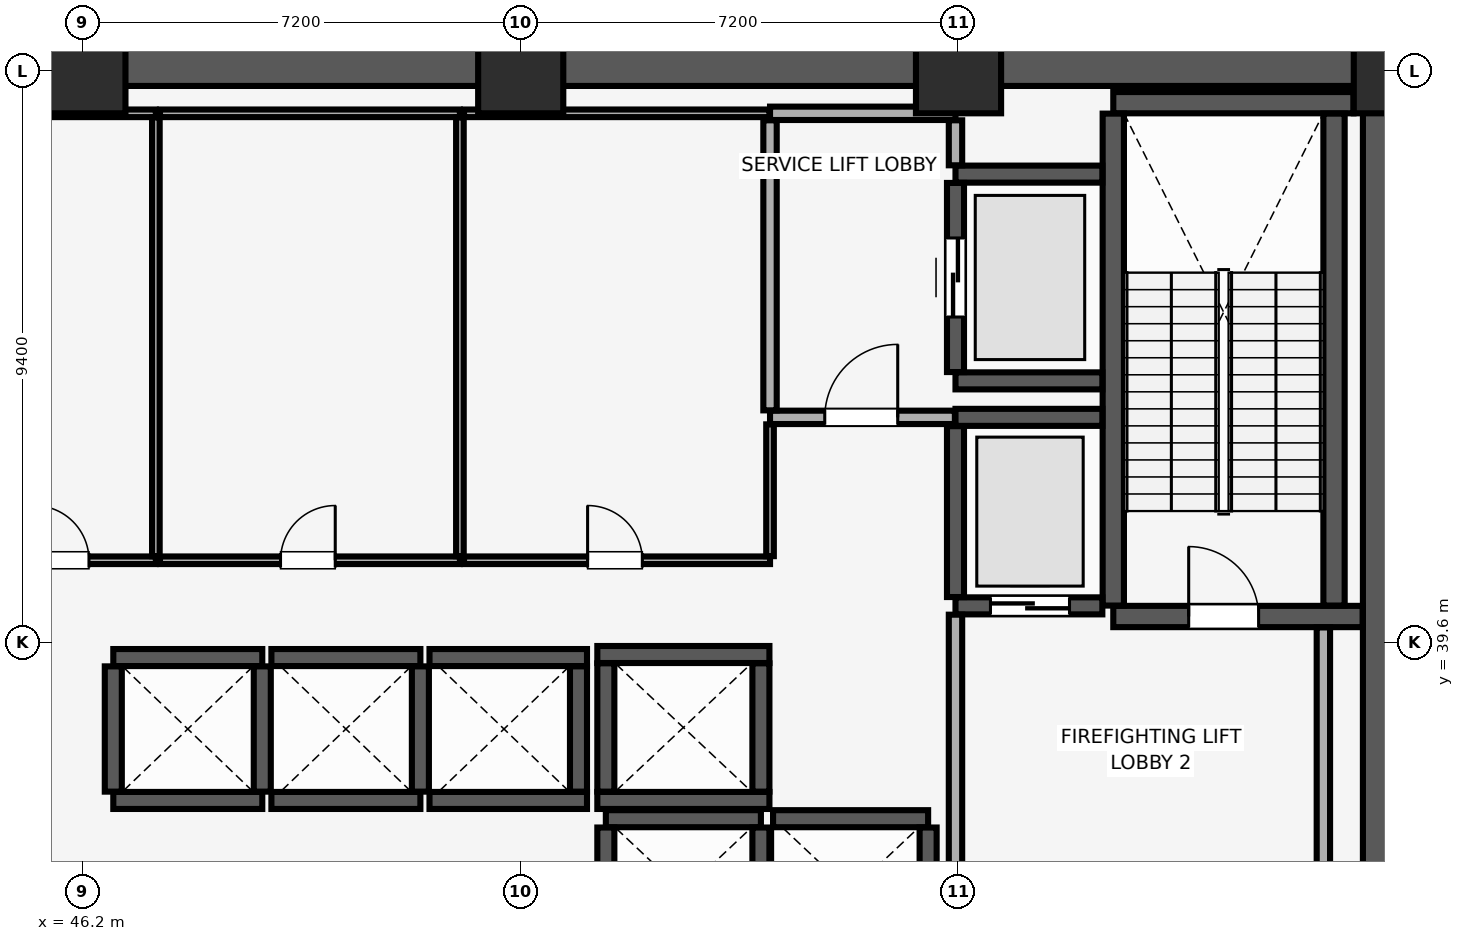
"""IFC4 building model, lengths in metres.
Left out: names, types, materials, properties, quantities, classifications, styles, units other than length and angle.
Written with IfcOpenShell. Run it as: python <this file> out.ifc"""

import sys

from ifc_helpers import new_model, si_unit, direction, frame, frame_2d, origin, origin_2d, place, context, subcontext, project, spatial, rectangle, extrude, element, fill, save


model = new_model("IFC4")
c1 = context("Model", 3, precision=1e-05, world=origin(), true_north=direction((0.0, 1.0)))
c2 = subcontext(c1, "Body", "Model", "MODEL_VIEW")
j1 = project(units=[si_unit("LENGTHUNIT", "METRE"), si_unit("PLANEANGLEUNIT", "RADIAN")], contexts=[c1])
p1 = place(None, origin())
s1 = spatial("IfcSite", under=j1, at=p1, CompositionType="ELEMENT")
p2 = place(p1, origin())
s2 = spatial("IfcBuilding", under=s1, at=p2, CompositionType="ELEMENT")
p3 = place(p2, frame((0.0, 0.0, 26.0)))
s3 = spatial("IfcBuildingStorey", under=s2, at=p3, CompositionType="ELEMENT", Elevation=26.0)
for number, where, z_axis, x_axis in (
    (1, (46.2, 49.0, 0.0), (0.0, 0.0, 1.0), (1.0, 0.0, 0.0)),
    (2, (53.4, 49.0, 0.0), (0.0, 0.0, 1.0), (1.0, 0.0, 0.0)),
    (3, (60.6, 49.0, 0.0), (0.0, 0.0, 1.0), (1.0, 0.0, 0.0)),
    (4, (67.8, 49.0, 0.0), (0.0, 0.0, 1.0), (1.0, 0.0, 0.0)),
):
    element("IfcColumn", number, at=place(p3, frame(where, z_axis=z_axis, x_axis=x_axis)), inside=s3, PredefinedType="COLUMN", context=c2, shape_type="SweptSolid", body=[
        extrude(rectangle(XDim=1.4, YDim=1.4, at=origin_2d()), origin(), (0.0, 0.0, 1.0), 5.16),
    ])
p4 = place(p3, frame((16.2, 49.3, 0.0), z_axis=(0.0, 0.0, 1.0), x_axis=(1.0, 0.0, 0.0)))
e5 = element("IfcWall", 5, at=p4, inside=s3, PredefinedType="SHEAR", context=c2, shape_type="SweptSolid", body=[
    extrude(rectangle(XDim=51.6, YDim=1.1, at=frame_2d((25.8, 0.0))), origin(), (0.0, 0.0, 1.0), 5.12),
])
p5 = place(p3, frame((67.8, 29.4, 0.0), z_axis=(0.0, 0.0, 1.0), x_axis=(0.0, 1.0, 0.0)))
e6 = element("IfcWall", 6, at=p5, inside=s3, PredefinedType="SHEAR", context=c2, shape_type="SweptSolid", body=[
    extrude(rectangle(XDim=19.2, YDim=1.1, at=frame_2d((9.6, 0.0))), origin(), (0.0, 0.0, 1.0), 5.12),
])
p6 = place(p3, frame((63.145, 40.025, 0.0), z_axis=(0.0, 0.0, 1.0), x_axis=(1.0, 0.0, 0.0)))
e7 = element("IfcWall", 7, at=p6, inside=s3, PredefinedType="SHEAR", context=c2, shape_type="SweptSolid", body=[
    extrude(rectangle(XDim=4.1, YDim=0.35, at=frame_2d((2.05, 0.0))), origin(), (0.0, 0.0, 1.0), 5.12),
])
p7 = place(p6, frame((1.24, 0.0, 0.0)))
e8 = element("IfcOpeningElement", 8, at=p7, cuts=e7, PredefinedType="OPENING", context=c2, shape_type="SweptSolid", body=[
    extrude(rectangle(XDim=1.15, YDim=2.15, at=frame_2d((0.575, 1.075))), frame((0.0, 0.185, 0.0), z_axis=(0.0, -1.0, 0.0), x_axis=(1.0, 0.0, 0.0)), (0.0, 0.0, 1.0), 0.37),
])
p8 = place(p3, frame((63.145, 48.475, 0.0), z_axis=(0.0, 0.0, 1.0), x_axis=(1.0, 0.0, 0.0)))
e9 = element("IfcWall", 9, at=p8, inside=s3, PredefinedType="SHEAR", context=c2, shape_type="SweptSolid", body=[
    extrude(rectangle(XDim=3.95, YDim=0.35, at=frame_2d((1.975, 0.0))), origin(), (0.0, 0.0, 1.0), 5.12),
])
for number, where, z_axis, x_axis in (
    (10, (63.145, 40.205, 0.0), (0.0, 0.0, 1.0), (0.0, 1.0, 0.0)),
    (11, (66.775, 40.205, 0.0), (0.0, 0.0, 1.0), (0.0, 1.0, 0.0)),
):
    element("IfcWall", number, at=place(p3, frame(where, z_axis=z_axis, x_axis=x_axis)), inside=s3, PredefinedType="SHEAR", context=c2, shape_type="SweptSolid", body=[
        extrude(rectangle(XDim=8.09, YDim=0.35, at=frame_2d((4.045, 0.0))), origin(), (0.0, 0.0, 1.0), 5.12),
    ])
for number, where, z_axis, x_axis in (
    (12, (46.7, 37.0, 0.0), (0.0, 0.0, 1.0), (1.0, 0.0, 0.0)),
    (13, (46.7, 39.35, 0.0), (0.0, 0.0, 1.0), (1.0, 0.0, 0.0)),
):
    element("IfcWall", number, at=place(p3, frame(where, z_axis=z_axis, x_axis=x_axis)), inside=s3, PredefinedType="SHEAR", context=c2, shape_type="SweptSolid", body=[
        extrude(rectangle(XDim=2.45, YDim=0.28, at=frame_2d((1.225, 0.0))), origin(), (0.0, 0.0, 1.0), 5.12),
    ])
for number, where, z_axis, x_axis in (
    (14, (46.7, 37.145, 0.0), (0.0, 0.0, 1.0), (0.0, 1.0, 0.0)),
    (15, (49.15, 37.145, 0.0), (0.0, 0.0, 1.0), (0.0, 1.0, 0.0)),
):
    element("IfcWall", number, at=place(p3, frame(where, z_axis=z_axis, x_axis=x_axis)), inside=s3, PredefinedType="SHEAR", context=c2, shape_type="SweptSolid", body=[
        extrude(rectangle(XDim=2.06, YDim=0.28, at=frame_2d((1.03, 0.0))), origin(), (0.0, 0.0, 1.0), 5.12),
    ])
for number, where, z_axis, x_axis in (
    (16, (49.3, 37.0, 0.0), (0.0, 0.0, 1.0), (1.0, 0.0, 0.0)),
    (17, (49.3, 39.35, 0.0), (0.0, 0.0, 1.0), (1.0, 0.0, 0.0)),
):
    element("IfcWall", number, at=place(p3, frame(where, z_axis=z_axis, x_axis=x_axis)), inside=s3, PredefinedType="SHEAR", context=c2, shape_type="SweptSolid", body=[
        extrude(rectangle(XDim=2.45, YDim=0.28, at=frame_2d((1.225, 0.0))), origin(), (0.0, 0.0, 1.0), 5.12),
    ])
p9 = place(p3, frame((51.75, 37.145, 0.0), z_axis=(0.0, 0.0, 1.0), x_axis=(0.0, 1.0, 0.0)))
e18 = element("IfcWall", 18, at=p9, inside=s3, PredefinedType="SHEAR", context=c2, shape_type="SweptSolid", body=[
    extrude(rectangle(XDim=2.06, YDim=0.28, at=frame_2d((1.03, 0.0))), origin(), (0.0, 0.0, 1.0), 5.12),
])
for number, where, z_axis, x_axis in (
    (19, (51.9, 37.0, 0.0), (0.0, 0.0, 1.0), (1.0, 0.0, 0.0)),
    (20, (51.9, 39.35, 0.0), (0.0, 0.0, 1.0), (1.0, 0.0, 0.0)),
):
    element("IfcWall", number, at=place(p3, frame(where, z_axis=z_axis, x_axis=x_axis)), inside=s3, PredefinedType="SHEAR", context=c2, shape_type="SweptSolid", body=[
        extrude(rectangle(XDim=2.59, YDim=0.28, at=frame_2d((1.295, 0.0))), origin(), (0.0, 0.0, 1.0), 5.12),
    ])
p10 = place(p3, frame((54.35, 37.145, 0.0), z_axis=(0.0, 0.0, 1.0), x_axis=(0.0, 1.0, 0.0)))
e21 = element("IfcWall", 21, at=p10, inside=s3, PredefinedType="SHEAR", context=c2, shape_type="SweptSolid", body=[
    extrude(rectangle(XDim=2.06, YDim=0.28, at=frame_2d((1.03, 0.0))), origin(), (0.0, 0.0, 1.0), 5.12),
])
p11 = place(p3, frame((54.8, 36.7, 0.0), z_axis=(0.0, 0.0, 1.0), x_axis=(1.0, 0.0, 0.0)))
e22 = element("IfcWall", 22, at=p11, inside=s3, PredefinedType="SHEAR", context=c2, shape_type="SweptSolid", body=[
    extrude(rectangle(XDim=2.55, YDim=0.28, at=frame_2d((1.275, 0.0))), origin(), (0.0, 0.0, 1.0), 5.12),
])
for number, where, z_axis, x_axis in (
    (23, (54.8, 34.445, 0.0), (0.0, 0.0, 1.0), (0.0, 1.0, 0.0)),
    (24, (57.35, 34.445, 0.0), (0.0, 0.0, 1.0), (0.0, 1.0, 0.0)),
):
    element("IfcWall", number, at=place(p3, frame(where, z_axis=z_axis, x_axis=x_axis)), inside=s3, PredefinedType="SHEAR", context=c2, shape_type="SweptSolid", body=[
        extrude(rectangle(XDim=2.11, YDim=0.28, at=frame_2d((1.055, 0.0))), origin(), (0.0, 0.0, 1.0), 5.12),
    ])
p12 = place(p3, frame((57.55, 36.7, 0.0), z_axis=(0.0, 0.0, 1.0), x_axis=(1.0, 0.0, 0.0)))
e25 = element("IfcWall", 25, at=p12, inside=s3, PredefinedType="SHEAR", context=c2, shape_type="SweptSolid", body=[
    extrude(rectangle(XDim=2.55, YDim=0.28, at=frame_2d((1.275, 0.0))), origin(), (0.0, 0.0, 1.0), 5.12),
])
p13 = place(p3, frame((60.1, 34.445, 0.0), z_axis=(0.0, 0.0, 1.0), x_axis=(0.0, 1.0, 0.0)))
e26 = element("IfcWall", 26, at=p13, inside=s3, PredefinedType="SHEAR", context=c2, shape_type="SweptSolid", body=[
    extrude(rectangle(XDim=2.11, YDim=0.28, at=frame_2d((1.055, 0.0))), origin(), (0.0, 0.0, 1.0), 5.12),
])
for number, where, z_axis, x_axis in (
    (27, (54.66, 37.0, 0.0), (0.0, 0.0, 1.0), (1.0, 0.0, 0.0)),
    (28, (54.66, 39.4, 0.0), (0.0, 0.0, 1.0), (1.0, 0.0, 0.0)),
):
    element("IfcWall", number, at=place(p3, frame(where, z_axis=z_axis, x_axis=x_axis)), inside=s3, PredefinedType="SHEAR", context=c2, shape_type="SweptSolid", body=[
        extrude(rectangle(XDim=2.83, YDim=0.28, at=frame_2d((1.415, 0.0))), origin(), (0.0, 0.0, 1.0), 5.12),
    ])
for number, where, z_axis, x_axis in (
    (29, (54.8, 37.145, 0.0), (0.0, 0.0, 1.0), (0.0, 1.0, 0.0)),
    (30, (57.35, 37.145, 0.0), (0.0, 0.0, 1.0), (0.0, 1.0, 0.0)),
):
    element("IfcWall", number, at=place(p3, frame(where, z_axis=z_axis, x_axis=x_axis)), inside=s3, PredefinedType="SHEAR", context=c2, shape_type="SweptSolid", body=[
        extrude(rectangle(XDim=2.11, YDim=0.28, at=frame_2d((1.055, 0.0))), origin(), (0.0, 0.0, 1.0), 5.12),
    ])
p14 = place(p3, frame((60.55, 40.2, 0.0), z_axis=(0.0, 0.0, 1.0), x_axis=(1.0, 0.0, 0.0)))
e31 = element("IfcWall", 31, at=p14, inside=s3, PredefinedType="SHEAR", context=c2, shape_type="SweptSolid", body=[
    extrude(rectangle(XDim=2.415, YDim=0.28, at=frame_2d((1.208, 0.0))), origin(), (0.0, 0.0, 1.0), 5.12),
])
p15 = place(p14, frame((0.575, 0.0, 0.0)))
e32 = element("IfcOpeningElement", 32, at=p15, cuts=e31, PredefinedType="OPENING", context=c2, shape_type="SweptSolid", body=[
    extrude(rectangle(XDim=1.3, YDim=2.3, at=frame_2d((0.65, 1.15))), frame((0.0, 0.15, 0.0), z_axis=(0.0, -1.0, 0.0), x_axis=(1.0, 0.0, 0.0)), (0.0, 0.0, 1.0), 0.3),
])
p16 = place(p3, frame((60.55, 43.3, 0.0), z_axis=(0.0, 0.0, 1.0), x_axis=(1.0, 0.0, 0.0)))
e33 = element("IfcWall", 33, at=p16, inside=s3, PredefinedType="SHEAR", context=c2, shape_type="SweptSolid", body=[
    extrude(rectangle(XDim=2.415, YDim=0.28, at=frame_2d((1.208, 0.0))), origin(), (0.0, 0.0, 1.0), 5.12),
])
p17 = place(p3, frame((60.55, 40.345, 0.0), z_axis=(0.0, 0.0, 1.0), x_axis=(0.0, 1.0, 0.0)))
e34 = element("IfcWall", 34, at=p17, inside=s3, PredefinedType="SHEAR", context=c2, shape_type="SweptSolid", body=[
    extrude(rectangle(XDim=2.81, YDim=0.28, at=frame_2d((1.405, 0.0))), origin(), (0.0, 0.0, 1.0), 5.12),
])
for number, where, z_axis, x_axis in (
    (35, (60.55, 43.9, 0.0), (0.0, 0.0, 1.0), (1.0, 0.0, 0.0)),
    (36, (60.55, 47.3, 0.0), (0.0, 0.0, 1.0), (1.0, 0.0, 0.0)),
):
    element("IfcWall", number, at=place(p3, frame(where, z_axis=z_axis, x_axis=x_axis)), inside=s3, PredefinedType="SHEAR", context=c2, shape_type="SweptSolid", body=[
        extrude(rectangle(XDim=2.415, YDim=0.28, at=frame_2d((1.208, 0.0))), origin(), (0.0, 0.0, 1.0), 5.12),
    ])
p18 = place(p3, frame((60.55, 44.045, 0.0), z_axis=(0.0, 0.0, 1.0), x_axis=(0.0, 1.0, 0.0)))
e37 = element("IfcWall", 37, at=p18, inside=s3, PredefinedType="SHEAR", context=c2, shape_type="SweptSolid", body=[
    extrude(rectangle(XDim=3.11, YDim=0.28, at=frame_2d((1.555, 0.0))), origin(), (0.0, 0.0, 1.0), 5.12),
])
p19 = place(p18, frame((0.905, 0.0, 0.0)))
e38 = element("IfcOpeningElement", 38, at=p19, cuts=e37, PredefinedType="OPENING", context=c2, shape_type="SweptSolid", body=[
    extrude(rectangle(XDim=1.3, YDim=2.3, at=frame_2d((0.65, 1.15))), frame((0.0, 0.15, 0.0), z_axis=(0.0, -1.0, 0.0), x_axis=(1.0, 0.0, 0.0)), (0.0, 0.0, 1.0), 0.3),
])
p20 = place(p3, frame((60.55, 34.415, 0.0), z_axis=(0.0, 0.0, 1.0), x_axis=(0.0, 1.0, 0.0)))
e39 = element("IfcWall", 39, at=p20, inside=s3, PredefinedType="PARTITIONING", context=c2, shape_type="SweptSolid", body=[
    extrude(rectangle(XDim=5.64, YDim=0.22, at=frame_2d((2.82, 0.0))), origin(), (0.0, 0.0, 1.0), 5.12),
])
p21 = place(p3, frame((66.6, 34.415, 0.0), z_axis=(0.0, 0.0, 1.0), x_axis=(0.0, 1.0, 0.0)))
e40 = element("IfcWall", 40, at=p21, inside=s3, PredefinedType="PARTITIONING", context=c2, shape_type="SweptSolid", body=[
    extrude(rectangle(XDim=5.43, YDim=0.22, at=frame_2d((2.715, 0.0))), origin(), (0.0, 0.0, 1.0), 5.12),
])
p22 = place(p3, frame((57.5, 43.3, 0.0), z_axis=(0.0, 0.0, 1.0), x_axis=(1.0, 0.0, 0.0)))
e41 = element("IfcWall", 41, at=p22, inside=s3, PredefinedType="PARTITIONING", context=c2, shape_type="SweptSolid", body=[
    extrude(rectangle(XDim=3.04, YDim=0.22, at=frame_2d((1.52, 0.0))), origin(), (0.0, 0.0, 1.0), 5.12),
])
p23 = place(p22, frame((0.9, 0.0, 0.0)))
e42 = element("IfcOpeningElement", 42, at=p23, cuts=e41, PredefinedType="OPENING", context=c2, shape_type="SweptSolid", body=[
    extrude(rectangle(XDim=1.2, YDim=2.15, at=frame_2d((0.6, 1.075))), frame((0.0, 0.12, 0.0), z_axis=(0.0, -1.0, 0.0), x_axis=(1.0, 0.0, 0.0)), (0.0, 0.0, 1.0), 0.24),
])
p24 = place(p3, frame((57.5, 48.3, 0.0), z_axis=(0.0, 0.0, 1.0), x_axis=(1.0, 0.0, 0.0)))
e43 = element("IfcWall", 43, at=p24, inside=s3, PredefinedType="PARTITIONING", context=c2, shape_type="SweptSolid", body=[
    extrude(rectangle(XDim=3.05, YDim=0.22, at=frame_2d((1.525, 0.0))), origin(), (0.0, 0.0, 1.0), 5.12),
])
p25 = place(p3, frame((57.5, 43.415, 0.0), z_axis=(0.0, 0.0, 1.0), x_axis=(0.0, 1.0, 0.0)))
e44 = element("IfcWall", 44, at=p25, inside=s3, PredefinedType="PARTITIONING", context=c2, shape_type="SweptSolid", body=[
    extrude(rectangle(XDim=4.77, YDim=0.22, at=frame_2d((2.385, 0.0))), origin(), (0.0, 0.0, 1.0), 5.12),
])
p26 = place(p3, frame((60.55, 47.445, 0.0), z_axis=(0.0, 0.0, 1.0), x_axis=(0.0, 1.0, 0.0)))
e45 = element("IfcWall", 45, at=p26, inside=s3, PredefinedType="PARTITIONING", context=c2, shape_type="SweptSolid", body=[
    extrude(rectangle(XDim=0.74, YDim=0.22, at=frame_2d((0.37, 0.0))), origin(), (0.0, 0.0, 1.0), 5.12),
])
p27 = place(p3, frame((44.3, 40.95, 0.0), z_axis=(0.0, 0.0, 1.0), x_axis=(1.0, 0.0, 0.0)))
e46 = element("IfcWall", 46, at=p27, inside=s3, PredefinedType="PARTITIONING", context=c2, shape_type="SweptSolid", body=[
    extrude(rectangle(XDim=3.1, YDim=0.125, at=frame_2d((1.55, 0.0))), origin(), (0.0, 0.0, 1.0), 5.12),
])
p28 = place(p27, frame((1.1, 0.0, 0.0)))
e47 = element("IfcOpeningElement", 47, at=p28, cuts=e46, PredefinedType="OPENING", context=c2, shape_type="SweptSolid", body=[
    extrude(rectangle(XDim=0.9, YDim=2.1, at=frame_2d((0.45, 1.05))), frame((0.0, 0.073, 0.0), z_axis=(0.0, -1.0, 0.0), x_axis=(1.0, 0.0, 0.0)), (0.0, 0.0, 1.0), 0.145),
])
p29 = place(p3, frame((44.3, 48.3, 0.0), z_axis=(0.0, 0.0, 1.0), x_axis=(1.0, 0.0, 0.0)))
e48 = element("IfcWall", 48, at=p29, inside=s3, PredefinedType="PARTITIONING", context=c2, shape_type="SweptSolid", body=[
    extrude(rectangle(XDim=3.1, YDim=0.125, at=frame_2d((1.55, 0.0))), origin(), (0.0, 0.0, 1.0), 5.12),
])
p30 = place(p3, frame((47.4, 41.018, 0.0), z_axis=(0.0, 0.0, 1.0), x_axis=(0.0, 1.0, 0.0)))
e49 = element("IfcWall", 49, at=p30, inside=s3, PredefinedType="PARTITIONING", context=c2, shape_type="SweptSolid", body=[
    extrude(rectangle(XDim=7.215, YDim=0.125, at=frame_2d((3.607, 0.0))), origin(), (0.0, 0.0, 1.0), 5.12),
])
p31 = place(p3, frame((47.468, 40.95, 0.0), z_axis=(0.0, 0.0, 1.0), x_axis=(1.0, 0.0, 0.0)))
e50 = element("IfcWall", 50, at=p31, inside=s3, PredefinedType="PARTITIONING", context=c2, shape_type="SweptSolid", body=[
    extrude(rectangle(XDim=4.932, YDim=0.125, at=frame_2d((2.466, 0.0))), origin(), (0.0, 0.0, 1.0), 5.12),
])
p32 = place(p31, frame((1.982, 0.0, 0.0)))
e51 = element("IfcOpeningElement", 51, at=p32, cuts=e50, PredefinedType="OPENING", context=c2, shape_type="SweptSolid", body=[
    extrude(rectangle(XDim=0.9, YDim=2.1, at=frame_2d((0.45, 1.05))), frame((0.0, 0.073, 0.0), z_axis=(0.0, -1.0, 0.0), x_axis=(1.0, 0.0, 0.0)), (0.0, 0.0, 1.0), 0.145),
])
p33 = place(p3, frame((47.468, 48.3, 0.0), z_axis=(0.0, 0.0, 1.0), x_axis=(1.0, 0.0, 0.0)))
e52 = element("IfcWall", 52, at=p33, inside=s3, PredefinedType="PARTITIONING", context=c2, shape_type="SweptSolid", body=[
    extrude(rectangle(XDim=4.932, YDim=0.125, at=frame_2d((2.466, 0.0))), origin(), (0.0, 0.0, 1.0), 5.12),
])
p34 = place(p3, frame((52.4, 41.018, 0.0), z_axis=(0.0, 0.0, 1.0), x_axis=(0.0, 1.0, 0.0)))
e53 = element("IfcWall", 53, at=p34, inside=s3, PredefinedType="PARTITIONING", context=c2, shape_type="SweptSolid", body=[
    extrude(rectangle(XDim=7.215, YDim=0.125, at=frame_2d((3.607, 0.0))), origin(), (0.0, 0.0, 1.0), 5.12),
])
p35 = place(p3, frame((52.468, 40.95, 0.0), z_axis=(0.0, 0.0, 1.0), x_axis=(1.0, 0.0, 0.0)))
e54 = element("IfcWall", 54, at=p35, inside=s3, PredefinedType="PARTITIONING", context=c2, shape_type="SweptSolid", body=[
    extrude(rectangle(XDim=5.032, YDim=0.125, at=frame_2d((2.516, 0.0))), origin(), (0.0, 0.0, 1.0), 5.12),
])
p36 = place(p35, frame((2.032, 0.0, 0.0)))
e55 = element("IfcOpeningElement", 55, at=p36, cuts=e54, PredefinedType="OPENING", context=c2, shape_type="SweptSolid", body=[
    extrude(rectangle(XDim=0.9, YDim=2.1, at=frame_2d((0.45, 1.05))), frame((0.0, 0.073, 0.0), z_axis=(0.0, -1.0, 0.0), x_axis=(1.0, 0.0, 0.0)), (0.0, 0.0, 1.0), 0.145),
])
p37 = place(p3, frame((52.468, 48.3, 0.0), z_axis=(0.0, 0.0, 1.0), x_axis=(1.0, 0.0, 0.0)))
e56 = element("IfcWall", 56, at=p37, inside=s3, PredefinedType="PARTITIONING", context=c2, shape_type="SweptSolid", body=[
    extrude(rectangle(XDim=5.022, YDim=0.125, at=frame_2d((2.511, 0.0))), origin(), (0.0, 0.0, 1.0), 5.12),
])
p38 = place(p3, frame((57.5, 41.018, 0.0), z_axis=(0.0, 0.0, 1.0), x_axis=(0.0, 1.0, 0.0)))
e57 = element("IfcWall", 57, at=p38, inside=s3, PredefinedType="PARTITIONING", context=c2, shape_type="SweptSolid", body=[
    extrude(rectangle(XDim=2.167, YDim=0.125, at=frame_2d((1.084, 0.0))), origin(), (0.0, 0.0, 1.0), 5.12),
])
p39 = place(p7, origin())
e58 = element("IfcDoor", 58, at=p39, inside=s3, OperationType="SINGLE_SWING_LEFT", PredefinedType="DOOR", context=c2, shape_type="SweptSolid", body=[
    extrude(rectangle(XDim=1.15, YDim=2.15, at=frame_2d((0.575, 1.075))), frame((0.0, 0.025, 0.0), z_axis=(0.0, -1.0, 0.0), x_axis=(1.0, 0.0, 0.0)), (0.0, 0.0, 1.0), 0.05),
])
fill(e8, e58)
p40 = place(p15, origin())
e59 = element("IfcDoor", 59, at=p40, inside=s3, OperationType="DOUBLE_DOOR_SLIDING", PredefinedType="DOOR", context=c2, shape_type="SweptSolid", body=[
    extrude(rectangle(XDim=1.3, YDim=2.3, at=frame_2d((0.65, 1.15))), frame((0.0, 0.025, 0.0), z_axis=(0.0, -1.0, 0.0), x_axis=(1.0, 0.0, 0.0)), (0.0, 0.0, 1.0), 0.05),
])
fill(e32, e59)
p41 = place(p19, origin())
e60 = element("IfcDoor", 60, at=p41, inside=s3, OperationType="DOUBLE_DOOR_SLIDING", PredefinedType="DOOR", context=c2, shape_type="SweptSolid", body=[
    extrude(rectangle(XDim=1.3, YDim=2.3, at=frame_2d((0.65, 1.15))), frame((0.0, 0.025, 0.0), z_axis=(0.0, -1.0, 0.0), x_axis=(1.0, 0.0, 0.0)), (0.0, 0.0, 1.0), 0.05),
])
fill(e38, e60)
p42 = place(p23, origin())
e61 = element("IfcDoor", 61, at=p42, inside=s3, OperationType="SINGLE_SWING_RIGHT", PredefinedType="DOOR", context=c2, shape_type="SweptSolid", body=[
    extrude(rectangle(XDim=1.2, YDim=2.15, at=frame_2d((0.6, 1.075))), frame((0.0, 0.025, 0.0), z_axis=(0.0, -1.0, 0.0), x_axis=(1.0, 0.0, 0.0)), (0.0, 0.0, 1.0), 0.05),
])
fill(e42, e61)
p43 = place(p28, origin())
e62 = element("IfcDoor", 62, at=p43, inside=s3, OperationType="SINGLE_SWING_LEFT", PredefinedType="DOOR", context=c2, shape_type="SweptSolid", body=[
    extrude(rectangle(XDim=0.9, YDim=2.1, at=frame_2d((0.45, 1.05))), frame((0.0, 0.025, 0.0), z_axis=(0.0, -1.0, 0.0), x_axis=(1.0, 0.0, 0.0)), (0.0, 0.0, 1.0), 0.05),
])
fill(e47, e62)
p44 = place(p32, origin())
e63 = element("IfcDoor", 63, at=p44, inside=s3, OperationType="SINGLE_SWING_RIGHT", PredefinedType="DOOR", context=c2, shape_type="SweptSolid", body=[
    extrude(rectangle(XDim=0.9, YDim=2.1, at=frame_2d((0.45, 1.05))), frame((0.0, 0.025, 0.0), z_axis=(0.0, -1.0, 0.0), x_axis=(1.0, 0.0, 0.0)), (0.0, 0.0, 1.0), 0.05),
])
fill(e51, e63)
p45 = place(p36, origin())
e64 = element("IfcDoor", 64, at=p45, inside=s3, OperationType="SINGLE_SWING_LEFT", PredefinedType="DOOR", context=c2, shape_type="SweptSolid", body=[
    extrude(rectangle(XDim=0.9, YDim=2.1, at=frame_2d((0.45, 1.05))), frame((0.0, 0.025, 0.0), z_axis=(0.0, -1.0, 0.0), x_axis=(1.0, 0.0, 0.0)), (0.0, 0.0, 1.0), 0.05),
])
fill(e55, e64)
save(model, sys.argv[1])
